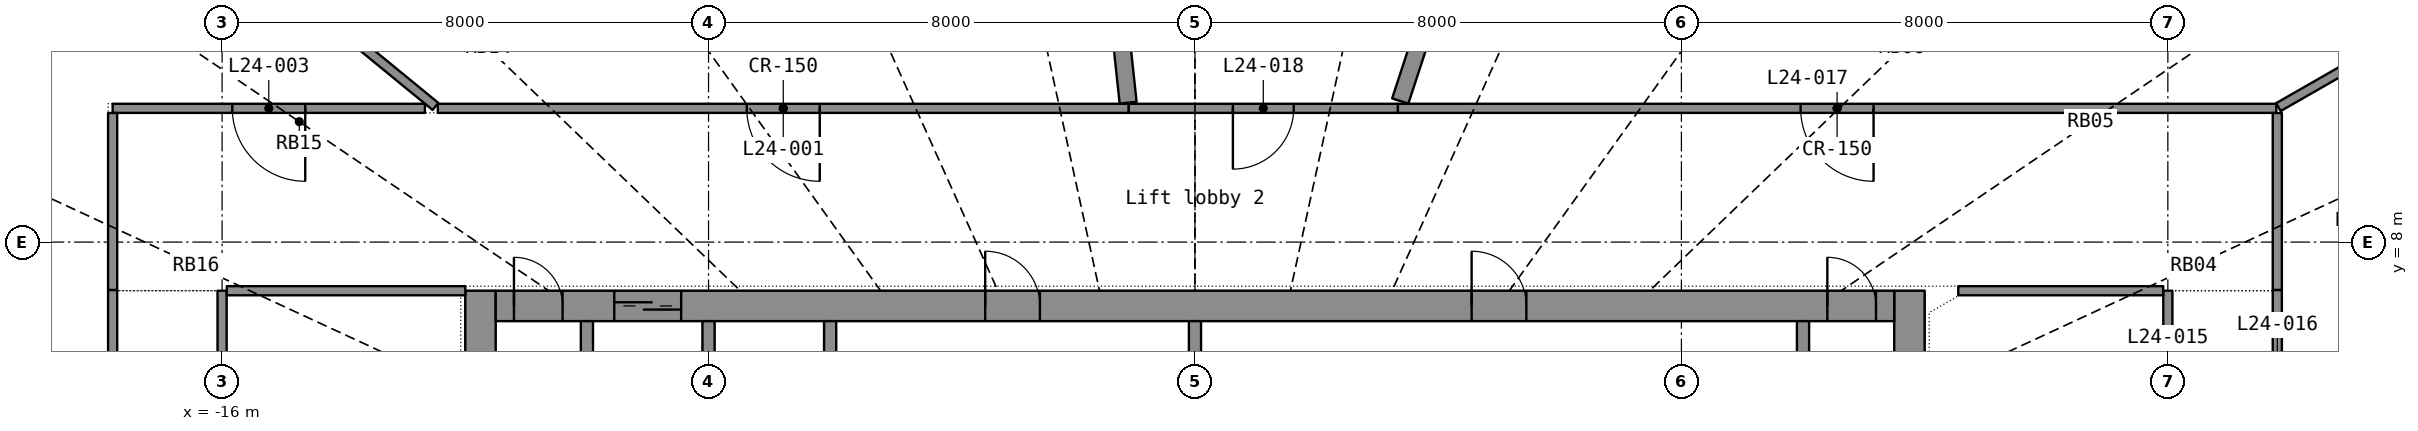
"""IFC4 building model, lengths in metres.
Left out: names, types, materials, properties, quantities, classifications, styles, units other than length and angle.
Written with IfcOpenShell. Run it as: python <this file> out.ifc"""

import sys

from ifc_helpers import new_model, si_unit, direction, frame, frame_2d, origin, place, context, subcontext, project, spatial, rectangle, extrude, element, fill, save


model = new_model("IFC4")
c1 = context("Model", 3, precision=1e-05, world=origin(), true_north=direction((0.0, 1.0)))
c2 = subcontext(c1, "Body", "Model", "MODEL_VIEW")
j1 = project(units=[si_unit("LENGTHUNIT", "METRE"), si_unit("PLANEANGLEUNIT", "RADIAN")], contexts=[c1])
p1 = place(None, origin())
s1 = spatial("IfcSite", under=j1, at=p1, CompositionType="ELEMENT")
p2 = place(p1, origin())
s2 = spatial("IfcBuilding", under=s1, at=p2, CompositionType="ELEMENT")
p3 = place(p2, frame((0.0, 0.0, 104.5)))
s3 = spatial("IfcBuildingStorey", under=s2, at=p3, CompositionType="ELEMENT", Elevation=104.5)
p4 = place(p3, frame((-11.75, -7.2, 0.0), z_axis=(0.0, 0.0, 1.0), x_axis=(0.0, 1.0, 0.0)))
e1 = element("IfcWall", 1, at=p4, inside=s3, PredefinedType="SHEAR", context=c2, shape_type="SweptSolid", body=[
    extrude(rectangle(XDim=14.4, YDim=0.5, at=frame_2d((7.2, 0.0))), origin(), (0.0, 0.0, 1.0), 3.3),
])
p5 = place(p4, frame((6.5, 0.0, 0.0)))
e2 = element("IfcOpeningElement", 2, at=p5, cuts=e1, PredefinedType="OPENING", context=c2, shape_type="SweptSolid", body=[
    extrude(rectangle(XDim=1.4, YDim=2.2, at=frame_2d((0.7, 1.1))), frame((0.0, 0.26, 0.0), z_axis=(0.0, -1.0, 0.0), x_axis=(1.0, 0.0, 0.0)), (0.0, 0.0, 1.0), 0.52),
])
p6 = place(p3, frame((11.75, -7.2, 0.0), z_axis=(0.0, 0.0, 1.0), x_axis=(0.0, 1.0, 0.0)))
e3 = element("IfcWall", 3, at=p6, inside=s3, PredefinedType="SHEAR", context=c2, shape_type="SweptSolid", body=[
    extrude(rectangle(XDim=14.4, YDim=0.5, at=frame_2d((7.2, 0.0))), origin(), (0.0, 0.0, 1.0), 3.3),
])
p7 = place(p6, frame((6.5, 0.0, 0.0)))
e4 = element("IfcOpeningElement", 4, at=p7, cuts=e3, PredefinedType="OPENING", context=c2, shape_type="SweptSolid", body=[
    extrude(rectangle(XDim=1.4, YDim=2.2, at=frame_2d((0.7, 1.1))), frame((0.0, 0.26, 0.0), z_axis=(0.0, -1.0, 0.0), x_axis=(1.0, 0.0, 0.0)), (0.0, 0.0, 1.0), 0.52),
])
p8 = place(p3, frame((-11.5, 6.95, 0.0), z_axis=(0.0, 0.0, 1.0), x_axis=(1.0, 0.0, 0.0)))
e5 = element("IfcWall", 5, at=p8, inside=s3, PredefinedType="SHEAR", context=c2, shape_type="SweptSolid", body=[
    extrude(rectangle(XDim=23.0, YDim=0.5, at=frame_2d((11.5, 0.0))), origin(), (0.0, 0.0, 1.0), 3.3),
])
p9 = place(p8, frame((1.95, 0.0, 0.0)))
e6 = element("IfcOpeningElement", 6, at=p9, cuts=e5, PredefinedType="OPENING", context=c2, shape_type="SweptSolid", body=[
    extrude(rectangle(XDim=1.1, YDim=2.2, at=frame_2d((0.55, 1.1))), frame((0.0, 0.26, 0.0), z_axis=(0.0, -1.0, 0.0), x_axis=(1.0, 0.0, 0.0)), (0.0, 0.0, 1.0), 0.52),
])
p10 = place(p8, frame((8.05, 0.0, 0.0)))
e7 = element("IfcOpeningElement", 7, at=p10, cuts=e5, PredefinedType="OPENING", context=c2, shape_type="SweptSolid", body=[
    extrude(rectangle(XDim=0.9, YDim=2.1, at=frame_2d((0.45, 1.05))), frame((0.0, 0.26, 0.0), z_axis=(0.0, -1.0, 0.0), x_axis=(1.0, 0.0, 0.0)), (0.0, 0.0, 1.0), 0.52),
])
p11 = place(p8, frame((16.05, 0.0, 0.0)))
e8 = element("IfcOpeningElement", 8, at=p11, cuts=e5, PredefinedType="OPENING", context=c2, shape_type="SweptSolid", body=[
    extrude(rectangle(XDim=0.9, YDim=2.1, at=frame_2d((0.45, 1.05))), frame((0.0, 0.26, 0.0), z_axis=(0.0, -1.0, 0.0), x_axis=(1.0, 0.0, 0.0)), (0.0, 0.0, 1.0), 0.52),
])
p12 = place(p8, frame((0.3, 0.0, 0.0)))
e9 = element("IfcOpeningElement", 9, at=p12, cuts=e5, PredefinedType="OPENING", context=c2, shape_type="SweptSolid", body=[
    extrude(rectangle(XDim=0.8, YDim=2.05, at=frame_2d((0.4, 1.025))), frame((0.0, 0.26, 0.0), z_axis=(0.0, -1.0, 0.0), x_axis=(1.0, 0.0, 0.0)), (0.0, 0.0, 1.0), 0.52),
])
p13 = place(p8, frame((21.9, 0.0, 0.0)))
e10 = element("IfcOpeningElement", 10, at=p13, cuts=e5, PredefinedType="OPENING", context=c2, shape_type="SweptSolid", body=[
    extrude(rectangle(XDim=0.8, YDim=2.05, at=frame_2d((0.4, 1.025))), frame((0.0, 0.26, 0.0), z_axis=(0.0, -1.0, 0.0), x_axis=(1.0, 0.0, 0.0)), (0.0, 0.0, 1.0), 0.52),
])
for number, where, z_axis, x_axis in (
    (11, (-10.0, 3.9, 0.0), (0.0, 0.0, 1.0), (0.0, 1.0, 0.0)),
    (12, (-8.0, 3.9, 0.0), (0.0, 0.0, 1.0), (0.0, 1.0, 0.0)),
    (13, (-6.0, 3.9, 0.0), (0.0, 0.0, 1.0), (0.0, 1.0, 0.0)),
    (14, (10.0, 3.9, 0.0), (0.0, 0.0, 1.0), (0.0, 1.0, 0.0)),
):
    element("IfcWall", number, at=place(p3, frame(where, z_axis=z_axis, x_axis=x_axis)), inside=s3, PredefinedType="SHEAR", context=c2, shape_type="SweptSolid", body=[
        extrude(rectangle(XDim=2.8, YDim=0.2, at=frame_2d((1.4, 0.0))), origin(), (0.0, 0.0, 1.0), 3.3),
    ])
p14 = place(p3, frame((0.0, 3.9, 0.0), z_axis=(0.0, 0.0, 1.0), x_axis=(0.0, 1.0, 0.0)))
e15 = element("IfcWall", 15, at=p14, inside=s3, PredefinedType="PARTITIONING", context=c2, shape_type="SweptSolid", body=[
    extrude(rectangle(XDim=2.8, YDim=0.2, at=frame_2d((1.4, 0.0))), origin(), (0.0, 0.0, 1.0), 3.3),
])
p15 = place(p3, frame((17.784, 10.2, 0.0), z_axis=(0.0, 0.0, 1.0), x_axis=(-1.0, 0.0, 0.0)))
e16 = element("IfcWall", 16, at=p15, inside=s3, PredefinedType="PARTITIONING", context=c2, shape_type="SweptSolid", body=[
    extrude(rectangle(XDim=14.447, YDim=0.15, at=frame_2d((7.224, 0.0))), origin(), (0.0, 0.0, 1.0), 2.4),
])
p16 = place(p15, frame((6.624, 0.0, 0.0)))
e17 = element("IfcOpeningElement", 17, at=p16, cuts=e16, PredefinedType="OPENING", context=c2, shape_type="SweptSolid", body=[
    extrude(rectangle(XDim=1.2, YDim=2.2, at=frame_2d((0.6, 1.1))), frame((0.0, 0.085, 0.0), z_axis=(0.0, -1.0, 0.0), x_axis=(1.0, 0.0, 0.0)), (0.0, 0.0, 1.0), 0.17),
])
p17 = place(p3, frame((-1.089, 10.2, 0.0), z_axis=(0.0, 0.0, 1.0), x_axis=(-1.0, 0.0, 0.0)))
e18 = element("IfcWall", 18, at=p17, inside=s3, PredefinedType="PARTITIONING", context=c2, shape_type="SweptSolid", body=[
    extrude(rectangle(XDim=11.363, YDim=0.15, at=frame_2d((5.682, 0.0))), origin(), (0.0, 0.0, 1.0), 2.4),
])
p18 = place(p17, frame((5.082, 0.0, 0.0)))
e19 = element("IfcOpeningElement", 19, at=p18, cuts=e18, PredefinedType="OPENING", context=c2, shape_type="SweptSolid", body=[
    extrude(rectangle(XDim=1.2, YDim=2.2, at=frame_2d((0.6, 1.1))), frame((0.0, 0.085, 0.0), z_axis=(0.0, -1.0, 0.0), x_axis=(1.0, 0.0, 0.0)), (0.0, 0.0, 1.0), 0.17),
])
p19 = place(p3, frame((-1.099, 10.292, 0.0), z_axis=(0.0, 0.0, 1.0), x_axis=(-0.106202827, 0.994344487, 0.0)))
e20 = element("IfcWall", 20, at=p19, inside=s3, PredefinedType="PARTITIONING", context=c2, shape_type="SweptSolid", body=[
    extrude(rectangle(XDim=10.857, YDim=0.28, at=frame_2d((5.429, 0.0))), origin(), (0.0, 0.0, 1.0), 2.4),
])
p20 = place(p19, frame((4.679, 0.0, 1.0)))
e21 = element("IfcOpeningElement", 21, at=p20, cuts=e20, PredefinedType="OPENING", context=c2, shape_type="SweptSolid", body=[
    extrude(rectangle(XDim=1.5, YDim=1.2, at=frame_2d((0.75, 0.6))), frame((0.0, 0.15, 0.0), z_axis=(0.0, -1.0, 0.0), x_axis=(1.0, 0.0, 0.0)), (0.0, 0.0, 1.0), 0.3),
])
p21 = place(p3, frame((6.689, 20.448, 0.0), z_axis=(0.0, 0.0, 1.0), x_axis=(-0.310888923, -0.950446252, 0.0)))
e22 = element("IfcWall", 22, at=p21, inside=s3, PredefinedType="PARTITIONING", context=c2, shape_type="SweptSolid", body=[
    extrude(rectangle(XDim=10.656, YDim=0.28, at=frame_2d((5.328, 0.0))), origin(), (0.0, 0.0, 1.0), 2.4),
])
p22 = place(p3, frame((-17.8, 7.212, 0.0), z_axis=(0.0, 0.0, 1.0), x_axis=(0.0, -1.0, 0.0)))
e23 = element("IfcWall", 23, at=p22, inside=s3, PredefinedType="PARTITIONING", context=c2, shape_type="SweptSolid", body=[
    extrude(rectangle(XDim=8.488, YDim=0.15, at=frame_2d((4.244, 0.0))), origin(), (0.0, 0.0, 1.0), 2.4),
])
p23 = place(p22, frame((3.644, 0.0, 0.0)))
e24 = element("IfcOpeningElement", 24, at=p23, cuts=e23, PredefinedType="OPENING", context=c2, shape_type="SweptSolid", body=[
    extrude(rectangle(XDim=1.2, YDim=2.2, at=frame_2d((0.6, 1.1))), frame((0.0, 0.085, 0.0), z_axis=(0.0, -1.0, 0.0), x_axis=(1.0, 0.0, 0.0)), (0.0, 0.0, 1.0), 0.17),
])
p24 = place(p3, frame((-18.283, 14.976, 0.0), z_axis=(0.0, 0.0, 1.0), x_axis=(0.773592541, -0.633683344, 0.0)))
e25 = element("IfcWall", 25, at=p24, inside=s3, PredefinedType="PARTITIONING", context=c2, shape_type="SweptSolid", body=[
    extrude(rectangle(XDim=7.488, YDim=0.15, at=frame_2d((3.744, 0.0))), origin(), (0.0, 0.0, 1.0), 2.4),
])
p25 = place(p3, frame((-16.0, 0.9, 0.0), z_axis=(0.0, 0.0, 1.0), x_axis=(0.0, 1.0, 0.0)))
e26 = element("IfcWall", 26, at=p25, inside=s3, PredefinedType="PARTITIONING", context=c2, shape_type="SweptSolid", body=[
    extrude(rectangle(XDim=6.3, YDim=0.15, at=frame_2d((3.15, 0.0))), origin(), (0.0, 0.0, 1.0), 2.4),
])
p26 = place(p25, frame((2.55, 0.0, 0.0)))
e27 = element("IfcOpeningElement", 27, at=p26, cuts=e26, PredefinedType="OPENING", context=c2, shape_type="SweptSolid", body=[
    extrude(rectangle(XDim=1.2, YDim=2.2, at=frame_2d((0.6, 1.1))), frame((0.0, 0.085, 0.0), z_axis=(0.0, -1.0, 0.0), x_axis=(1.0, 0.0, 0.0)), (0.0, 0.0, 1.0), 0.17),
])
p27 = place(p3, frame((-12.665, 10.2, 0.0), z_axis=(0.0, 0.0, 1.0), x_axis=(-1.0, 0.0, 0.0)))
e28 = element("IfcWall", 28, at=p27, inside=s3, PredefinedType="PARTITIONING", context=c2, shape_type="SweptSolid", body=[
    extrude(rectangle(XDim=5.135, YDim=0.15, at=frame_2d((2.568, 0.0))), origin(), (0.0, 0.0, 1.0), 2.4),
])
p28 = place(p27, frame((1.968, 0.0, 0.0)))
e29 = element("IfcOpeningElement", 29, at=p28, cuts=e28, PredefinedType="OPENING", context=c2, shape_type="SweptSolid", body=[
    extrude(rectangle(XDim=1.2, YDim=2.2, at=frame_2d((0.6, 1.1))), frame((0.0, 0.085, 0.0), z_axis=(0.0, -1.0, 0.0), x_axis=(1.0, 0.0, 0.0)), (0.0, 0.0, 1.0), 0.17),
])
p29 = place(p3, frame((3.336, 10.2, 0.0), z_axis=(0.0, 0.0, 1.0), x_axis=(-1.0, 0.0, 0.0)))
e30 = element("IfcWall", 30, at=p29, inside=s3, PredefinedType="PARTITIONING", context=c2, shape_type="SweptSolid", body=[
    extrude(rectangle(XDim=4.424, YDim=0.15, at=frame_2d((2.212, 0.0))), origin(), (0.0, 0.0, 1.0), 2.4),
])
p30 = place(p29, frame((1.712, 0.0, 0.0)))
e31 = element("IfcOpeningElement", 31, at=p30, cuts=e30, PredefinedType="OPENING", context=c2, shape_type="SweptSolid", body=[
    extrude(rectangle(XDim=1.0, YDim=2.2, at=frame_2d((0.5, 1.1))), frame((0.0, 0.085, 0.0), z_axis=(0.0, -1.0, 0.0), x_axis=(1.0, 0.0, 0.0)), (0.0, 0.0, 1.0), 0.17),
])
p31 = place(p3, frame((-15.923, 7.2, 0.0), z_axis=(0.0, 0.0, 1.0), x_axis=(1.0, 0.0, 0.0)))
e32 = element("IfcWall", 32, at=p31, inside=s3, PredefinedType="PARTITIONING", context=c2, shape_type="SweptSolid", body=[
    extrude(rectangle(XDim=3.923, YDim=0.15, at=frame_2d((1.961, 0.0))), origin(), (0.0, 0.0, 1.0), 2.4),
])
p32 = place(p3, frame((21.183, 12.149, 0.0), z_axis=(0.0, 0.0, 1.0), x_axis=(-0.867451833, -0.497521173, 0.0)))
e33 = element("IfcWall", 33, at=p32, inside=s3, PredefinedType="PARTITIONING", context=c2, shape_type="SweptSolid", body=[
    extrude(rectangle(XDim=3.879, YDim=0.15, at=frame_2d((1.939, 0.0))), origin(), (0.0, 0.0, 1.0), 2.4),
])
p33 = place(p3, frame((16.0, 7.2, 0.0), z_axis=(0.0, 0.0, 1.0), x_axis=(0.0, -1.0, 0.0)))
e34 = element("IfcWall", 34, at=p33, inside=s3, PredefinedType="PARTITIONING", context=c2, shape_type="SweptSolid", body=[
    extrude(rectangle(XDim=3.55, YDim=0.15, at=frame_2d((1.775, 0.0))), origin(), (0.0, 0.0, 1.0), 2.4),
])
p34 = place(p33, frame((1.3, 0.0, 0.0)))
e35 = element("IfcOpeningElement", 35, at=p34, cuts=e34, PredefinedType="OPENING", context=c2, shape_type="SweptSolid", body=[
    extrude(rectangle(XDim=0.95, YDim=2.15, at=frame_2d((0.475, 1.075))), frame((0.0, 0.085, 0.0), z_axis=(0.0, -1.0, 0.0), x_axis=(1.0, 0.0, 0.0)), (0.0, 0.0, 1.0), 0.17),
])
p35 = place(p3, frame((12.553, 7.2, 0.0), z_axis=(0.0, 0.0, 1.0), x_axis=(1.0, 0.0, 0.0)))
e36 = element("IfcWall", 36, at=p35, inside=s3, PredefinedType="PARTITIONING", context=c2, shape_type="SweptSolid", body=[
    extrude(rectangle(XDim=3.37, YDim=0.15, at=frame_2d((1.685, 0.0))), origin(), (0.0, 0.0, 1.0), 2.4),
])
p36 = place(p3, frame((17.8, 4.069, 0.0), z_axis=(0.0, 0.0, 1.0), x_axis=(0.0, 1.0, 0.0)))
e37 = element("IfcWall", 37, at=p36, inside=s3, PredefinedType="PARTITIONING", context=c2, shape_type="SweptSolid", body=[
    extrude(rectangle(XDim=3.143, YDim=0.15, at=frame_2d((1.572, 0.0))), origin(), (0.0, 0.0, 1.0), 2.4),
])
p37 = place(p36, frame((1.097, 0.0, 0.0)))
e38 = element("IfcOpeningElement", 38, at=p37, cuts=e37, PredefinedType="OPENING", context=c2, shape_type="SweptSolid", body=[
    extrude(rectangle(XDim=0.95, YDim=2.15, at=frame_2d((0.475, 1.075))), frame((0.0, 0.085, 0.0), z_axis=(0.0, -1.0, 0.0), x_axis=(1.0, 0.0, 0.0)), (0.0, 0.0, 1.0), 0.17),
])
for number, where, z_axis, x_axis in (
    (39, (17.8, 7.213, 0.0), (0.0, 0.0, 1.0), (0.0, 1.0, 0.0)),
    (40, (-17.8, 10.123, 0.0), (0.0, 0.0, 1.0), (0.0, -1.0, 0.0)),
):
    element("IfcWall", number, at=place(p3, frame(where, z_axis=z_axis, x_axis=x_axis)), inside=s3, PredefinedType="PARTITIONING", context=c2, shape_type="SweptSolid", body=[
        extrude(rectangle(XDim=2.91, YDim=0.15, at=frame_2d((1.455, 0.0))), origin(), (0.0, 0.0, 1.0), 2.4),
    ])
p38 = place(p9, origin())
e41 = element("IfcDoor", 41, at=p38, inside=s3, OperationType="DOUBLE_DOOR_SLIDING", PredefinedType="DOOR", context=c2, shape_type="SweptSolid", body=[
    extrude(rectangle(XDim=1.1, YDim=2.2, at=frame_2d((0.55, 1.1))), frame((0.0, 0.025, 0.0), z_axis=(0.0, -1.0, 0.0), x_axis=(1.0, 0.0, 0.0)), (0.0, 0.0, 1.0), 0.05),
])
fill(e6, e41)
p39 = place(p10, origin())
e42 = element("IfcDoor", 42, at=p39, inside=s3, OperationType="SINGLE_SWING_LEFT", PredefinedType="DOOR", context=c2, shape_type="SweptSolid", body=[
    extrude(rectangle(XDim=0.9, YDim=2.1, at=frame_2d((0.45, 1.05))), frame((0.0, 0.025, 0.0), z_axis=(0.0, -1.0, 0.0), x_axis=(1.0, 0.0, 0.0)), (0.0, 0.0, 1.0), 0.05),
])
fill(e7, e42)
p40 = place(p11, origin())
e43 = element("IfcDoor", 43, at=p40, inside=s3, OperationType="SINGLE_SWING_LEFT", PredefinedType="DOOR", context=c2, shape_type="SweptSolid", body=[
    extrude(rectangle(XDim=0.9, YDim=2.1, at=frame_2d((0.45, 1.05))), frame((0.0, 0.025, 0.0), z_axis=(0.0, -1.0, 0.0), x_axis=(1.0, 0.0, 0.0)), (0.0, 0.0, 1.0), 0.05),
])
fill(e8, e43)
p41 = place(p12, origin())
e44 = element("IfcDoor", 44, at=p41, inside=s3, OperationType="SINGLE_SWING_LEFT", PredefinedType="DOOR", context=c2, shape_type="SweptSolid", body=[
    extrude(rectangle(XDim=0.8, YDim=2.05, at=frame_2d((0.4, 1.025))), frame((0.0, 0.025, 0.0), z_axis=(0.0, -1.0, 0.0), x_axis=(1.0, 0.0, 0.0)), (0.0, 0.0, 1.0), 0.05),
])
fill(e9, e44)
p42 = place(p13, origin())
e45 = element("IfcDoor", 45, at=p42, inside=s3, OperationType="SINGLE_SWING_LEFT", PredefinedType="DOOR", context=c2, shape_type="SweptSolid", body=[
    extrude(rectangle(XDim=0.8, YDim=2.05, at=frame_2d((0.4, 1.025))), frame((0.0, 0.025, 0.0), z_axis=(0.0, -1.0, 0.0), x_axis=(1.0, 0.0, 0.0)), (0.0, 0.0, 1.0), 0.05),
])
fill(e10, e45)
p43 = place(p18, origin())
e46 = element("IfcDoor", 46, at=p43, inside=s3, OperationType="DOUBLE_DOOR_SINGLE_SWING", PredefinedType="DOOR", context=c2, shape_type="SweptSolid", body=[
    extrude(rectangle(XDim=1.2, YDim=2.2, at=frame_2d((0.6, 1.1))), frame((0.0, 0.025, 0.0), z_axis=(0.0, -1.0, 0.0), x_axis=(1.0, 0.0, 0.0)), (0.0, 0.0, 1.0), 0.05),
])
fill(e19, e46)
p44 = place(p28, origin())
e47 = element("IfcDoor", 47, at=p44, inside=s3, OperationType="DOUBLE_DOOR_SINGLE_SWING", PredefinedType="DOOR", context=c2, shape_type="SweptSolid", body=[
    extrude(rectangle(XDim=1.2, YDim=2.2, at=frame_2d((0.6, 1.1))), frame((0.0, 0.025, 0.0), z_axis=(0.0, -1.0, 0.0), x_axis=(1.0, 0.0, 0.0)), (0.0, 0.0, 1.0), 0.05),
])
fill(e29, e47)
p45 = place(p16, origin())
e48 = element("IfcDoor", 48, at=p45, inside=s3, OperationType="DOUBLE_DOOR_SINGLE_SWING", PredefinedType="DOOR", context=c2, shape_type="SweptSolid", body=[
    extrude(rectangle(XDim=1.2, YDim=2.2, at=frame_2d((0.6, 1.1))), frame((0.0, 0.025, 0.0), z_axis=(0.0, -1.0, 0.0), x_axis=(1.0, 0.0, 0.0)), (0.0, 0.0, 1.0), 0.05),
])
fill(e17, e48)
p46 = place(p30, origin())
e49 = element("IfcDoor", 49, at=p46, inside=s3, OperationType="SINGLE_SWING_RIGHT", PredefinedType="DOOR", context=c2, shape_type="SweptSolid", body=[
    extrude(rectangle(XDim=1.0, YDim=2.2, at=frame_2d((0.5, 1.1))), frame((0.0, 0.025, 0.0), z_axis=(0.0, -1.0, 0.0), x_axis=(1.0, 0.0, 0.0)), (0.0, 0.0, 1.0), 0.05),
])
fill(e31, e49)
save(model, sys.argv[1])
